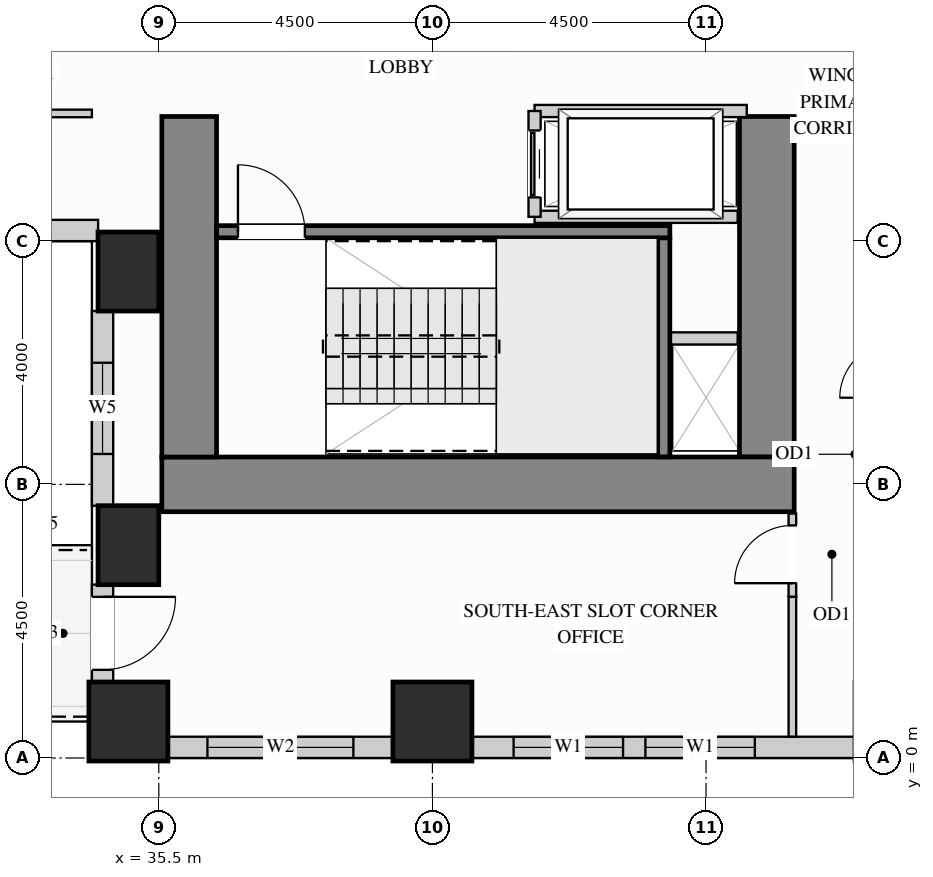
"""IFC4 building model, lengths in metres.
Left out: names, types, materials, properties, quantities, classifications, styles, units other than length and angle.
Written with IfcOpenShell. Run it as: python <this file> out.ifc"""

import sys

from ifc_helpers import new_model, si_unit, direction, frame, frame_2d, origin, origin_2d, place, context, subcontext, project, spatial, rectangle, extrude, source, transform, mapped, element, fill, save


model = new_model("IFC4")
c1 = context("Model", 3, precision=1e-05, world=origin(), true_north=direction((0.0, 1.0)))
c2 = subcontext(c1, "Body", "Model", "MODEL_VIEW")
j1 = project(units=[si_unit("LENGTHUNIT", "METRE"), si_unit("PLANEANGLEUNIT", "RADIAN")], contexts=[c1])
p1 = place(None, origin())
s1 = spatial("IfcSite", under=j1, at=p1, CompositionType="ELEMENT")
p2 = place(p1, origin())
s2 = spatial("IfcBuilding", under=s1, at=p2, CompositionType="ELEMENT")
p3 = place(p2, frame((0.0, 0.0, 47.7)))
s3 = spatial("IfcBuildingStorey", under=s2, at=p3, CompositionType="ELEMENT", Elevation=47.7)
m1 = source(origin(), c2, "Body", "SweptSolid", [
    extrude(rectangle(XDim=1.0, YDim=1.3, at=origin_2d()), origin(), (0.0, 0.0, 1.0), 3.38),
])
for number, where, z_axis, x_axis in (
    (1, (35.0, 3.5, 0.0), (0.0, 0.0, 1.0), (1.0, 0.0, 0.0)),
    (2, (35.0, 8.0, 0.0), (0.0, 0.0, 1.0), (1.0, 0.0, 0.0)),
):
    element("IfcColumn", number, at=place(p3, frame(where, z_axis=z_axis, x_axis=x_axis)), inside=s3, PredefinedType="COLUMN", context=c2, shape_type="MappedRepresentation", body=[
        mapped(m1, transform((0.0, 0.0, 0.0), x_axis=(1.0, 0.0, 0.0), y_axis=(0.0, 1.0, 0.0), z_axis=(0.0, 0.0, 1.0))),
    ])
m2 = source(origin(), c2, "Body", "SweptSolid", [
    extrude(rectangle(XDim=1.3, YDim=1.3, at=origin_2d()), origin(), (0.0, 0.0, 1.0), 3.38),
])
for number, where, z_axis, x_axis in (
    (3, (35.0, 0.6, 0.0), (0.0, 0.0, 1.0), (1.0, 0.0, 0.0)),
    (4, (40.0, 0.6, 0.0), (0.0, 0.0, 1.0), (1.0, 0.0, 0.0)),
):
    element("IfcColumn", number, at=place(p3, frame(where, z_axis=z_axis, x_axis=x_axis)), inside=s3, PredefinedType="COLUMN", context=c2, shape_type="MappedRepresentation", body=[
        mapped(m2, transform((0.0, 0.0, 0.0), x_axis=(1.0, 0.0, 0.0), y_axis=(0.0, 1.0, 0.0), z_axis=(0.0, 0.0, 1.0))),
    ])
m3 = source(origin(), c2, "Body", "SweptSolid", [
    extrude(rectangle(XDim=5.6, YDim=0.9, at=frame_2d((2.8, 0.0))), origin(), (0.0, 0.0, 1.0), 3.38),
])
p4 = place(p3, frame((45.5, 4.95, 0.0), z_axis=(0.0, 0.0, 1.0), x_axis=(0.0, 1.0, 0.0)))
e5 = element("IfcWall", 5, at=p4, inside=s3, PredefinedType="SHEAR", context=c2, shape_type="MappedRepresentation", body=[
    mapped(m3, transform((0.0, 0.0, 0.0), x_axis=(1.0, 0.0, 0.0), y_axis=(0.0, 1.0, 0.0), z_axis=(0.0, 0.0, 1.0))),
])
m4 = source(origin(), c2, "Body", "SweptSolid", [
    extrude(rectangle(XDim=10.4, YDim=0.9, at=frame_2d((5.2, 0.0))), origin(), (0.0, 0.0, 1.0), 3.38),
])
p5 = place(p3, frame((35.55, 4.5, 0.0), z_axis=(0.0, 0.0, 1.0), x_axis=(1.0, 0.0, 0.0)))
e6 = element("IfcWall", 6, at=p5, inside=s3, PredefinedType="SHEAR", context=c2, shape_type="MappedRepresentation", body=[
    mapped(m4, transform((0.0, 0.0, 0.0), x_axis=(1.0, 0.0, 0.0), y_axis=(0.0, 1.0, 0.0), z_axis=(0.0, 0.0, 1.0))),
])
p6 = place(p3, frame((36.0, 4.95, 0.0), z_axis=(0.0, 0.0, 1.0), x_axis=(0.0, 1.0, 0.0)))
e7 = element("IfcWall", 7, at=p6, inside=s3, PredefinedType="SHEAR", context=c2, shape_type="MappedRepresentation", body=[
    mapped(m3, transform((0.0, 0.0, 0.0), x_axis=(1.0, 0.0, 0.0), y_axis=(0.0, 1.0, 0.0), z_axis=(0.0, 0.0, 1.0))),
])
p7 = place(p3, frame((30.998, 8.675, 0.0), z_axis=(0.0, 0.0, 1.0), x_axis=(1.0, 0.0, 0.0)))
e8 = element("IfcWall", 8, at=p7, inside=s3, PredefinedType="SOLIDWALL", context=c2, shape_type="SweptSolid", body=[
    extrude(rectangle(XDim=3.504, YDim=0.35, at=frame_2d((1.752, 0.0))), origin(), (0.0, 0.0, 1.0), 3.365),
])
p8 = place(p7, frame((1.002, 0.0, 0.78)))
e9 = element("IfcOpeningElement", 9, at=p8, cuts=e8, PredefinedType="OPENING", context=c2, shape_type="SweptSolid", body=[
    extrude(rectangle(XDim=1.5, YDim=2.0, at=frame_2d((0.75, 1.0))), frame((0.0, 0.185, 0.0), z_axis=(0.0, -1.0, 0.0), x_axis=(1.0, 0.0, 0.0)), (0.0, 0.0, 1.0), 0.37),
])
p9 = place(p3, frame((34.575, 7.352, 0.0), z_axis=(0.0, 0.0, 1.0), x_axis=(0.0, -1.0, 0.0)))
e10 = element("IfcWall", 10, at=p9, inside=s3, PredefinedType="SOLIDWALL", context=c2, shape_type="SweptSolid", body=[
    extrude(rectangle(XDim=3.204, YDim=0.35, at=frame_2d((1.602, 0.0))), origin(), (0.0, 0.0, 1.0), 2.51),
])
p10 = place(p9, frame((0.852, 0.0, 0.78)))
e11 = element("IfcOpeningElement", 11, at=p10, cuts=e10, PredefinedType="OPENING", context=c2, shape_type="SweptSolid", body=[
    extrude(rectangle(XDim=1.5, YDim=1.55, at=frame_2d((0.75, 0.775))), frame((0.0, 0.185, 0.0), z_axis=(0.0, -1.0, 0.0), x_axis=(1.0, 0.0, 0.0)), (0.0, 0.0, 1.0), 0.37),
])
p11 = place(p3, frame((34.575, 2.852, 0.0), z_axis=(0.0, 0.0, 1.0), x_axis=(0.0, -1.0, 0.0)))
e12 = element("IfcWall", 12, at=p11, inside=s3, PredefinedType="SOLIDWALL", context=c2, shape_type="SweptSolid", body=[
    extrude(rectangle(XDim=1.604, YDim=0.35, at=frame_2d((0.802, 0.0))), origin(), (0.0, 0.0, 1.0), 2.51),
])
p12 = place(p11, frame((0.202, 0.0, 0.0)))
e13 = element("IfcOpeningElement", 13, at=p12, cuts=e12, PredefinedType="OPENING", context=c2, shape_type="SweptSolid", body=[
    extrude(rectangle(XDim=1.2, YDim=2.15, at=frame_2d((0.6, 1.075))), frame((0.0, 0.185, 0.0), z_axis=(0.0, -1.0, 0.0), x_axis=(1.0, 0.0, 0.0)), (0.0, 0.0, 1.0), 0.37),
])
p13 = place(p3, frame((35.648, 0.175, 0.0), z_axis=(0.0, 0.0, 1.0), x_axis=(1.0, 0.0, 0.0)))
e14 = element("IfcWall", 14, at=p13, inside=s3, PredefinedType="SOLIDWALL", context=c2, shape_type="SweptSolid", body=[
    extrude(rectangle(XDim=3.704, YDim=0.35, at=frame_2d((1.852, 0.0))), origin(), (0.0, 0.0, 1.0), 2.51),
])
p14 = place(p13, frame((0.652, 0.0, 0.78)))
e15 = element("IfcOpeningElement", 15, at=p14, cuts=e14, PredefinedType="OPENING", context=c2, shape_type="SweptSolid", body=[
    extrude(rectangle(XDim=2.4, YDim=1.55, at=frame_2d((1.2, 0.775))), frame((0.0, 0.185, 0.0), z_axis=(0.0, -1.0, 0.0), x_axis=(1.0, 0.0, 0.0)), (0.0, 0.0, 1.0), 0.37),
])
p15 = place(p3, frame((40.648, 0.175, 0.0), z_axis=(0.0, 0.0, 1.0), x_axis=(1.0, 0.0, 0.0)))
e16 = element("IfcWall", 16, at=p15, inside=s3, PredefinedType="SOLIDWALL", context=c2, shape_type="SweptSolid", body=[
    extrude(rectangle(XDim=6.304, YDim=0.35, at=frame_2d((3.152, 0.0))), origin(), (0.0, 0.0, 1.0), 2.51),
])
p16 = place(p15, frame((0.687, 0.0, 0.78)))
e17 = element("IfcOpeningElement", 17, at=p16, cuts=e16, PredefinedType="OPENING", context=c2, shape_type="SweptSolid", body=[
    extrude(rectangle(XDim=1.8, YDim=1.55, at=frame_2d((0.9, 0.775))), frame((0.0, 0.185, 0.0), z_axis=(0.0, -1.0, 0.0), x_axis=(1.0, 0.0, 0.0)), (0.0, 0.0, 1.0), 0.37),
])
p17 = place(p15, frame((2.855, 0.0, 0.78)))
e18 = element("IfcOpeningElement", 18, at=p17, cuts=e16, PredefinedType="OPENING", context=c2, shape_type="SweptSolid", body=[
    extrude(rectangle(XDim=1.8, YDim=1.55, at=frame_2d((0.9, 0.775))), frame((0.0, 0.185, 0.0), z_axis=(0.0, -1.0, 0.0), x_axis=(1.0, 0.0, 0.0)), (0.0, 0.0, 1.0), 0.37),
])
p18 = place(p3, frame((45.92, 2.65, 0.0), z_axis=(0.0, 0.0, 1.0), x_axis=(0.0, 1.0, 0.0)))
e19 = element("IfcWall", 19, at=p18, inside=s3, PredefinedType="PARTITIONING", context=c2, shape_type="SweptSolid", body=[
    extrude(rectangle(XDim=1.37, YDim=0.125, at=frame_2d((0.685, 0.0))), origin(), (0.0, 0.0, 1.0), 3.365),
])
p19 = place(p18, frame((0.225, 0.0, 0.0)))
e20 = element("IfcOpeningElement", 20, at=p19, cuts=e19, PredefinedType="OPENING", context=c2, shape_type="SweptSolid", body=[
    extrude(rectangle(XDim=0.95, YDim=2.15, at=frame_2d((0.475, 1.075))), frame((0.0, 0.073, 0.0), z_axis=(0.0, -1.0, 0.0), x_axis=(1.0, 0.0, 0.0)), (0.0, 0.0, 1.0), 0.145),
])
m5 = source(origin(), c2, "Body", "SweptSolid", [
    extrude(rectangle(XDim=2.298, YDim=0.125, at=frame_2d((1.149, 0.0))), origin(), (0.0, 0.0, 1.0), 3.365),
])
p20 = place(p3, frame((45.92, 0.352, 0.0), z_axis=(0.0, 0.0, 1.0), x_axis=(0.0, 1.0, 0.0)))
e21 = element("IfcWall", 21, at=p20, inside=s3, PredefinedType="PARTITIONING", context=c2, shape_type="MappedRepresentation", body=[
    mapped(m5, transform((0.0, 0.0, 0.0), x_axis=(1.0, 0.0, 0.0), y_axis=(0.0, 1.0, 0.0), z_axis=(0.0, 0.0, 1.0))),
])
p21 = place(p3, frame((26.95, 10.6, 0.0), z_axis=(0.0, 0.0, 1.0), x_axis=(1.0, 0.0, 0.0)))
e22 = element("IfcWall", 22, at=p21, inside=s3, PredefinedType="PARTITIONING", context=c2, shape_type="SweptSolid", body=[
    extrude(rectangle(XDim=7.45, YDim=0.125, at=frame_2d((3.725, 0.0))), origin(), (0.0, 0.0, 1.0), 3.365),
])
p22 = place(p21, frame((4.683, 0.0, 0.0)))
e23 = element("IfcOpeningElement", 23, at=p22, cuts=e22, PredefinedType="OPENING", context=c2, shape_type="SweptSolid", body=[
    extrude(rectangle(XDim=0.95, YDim=2.15, at=frame_2d((0.475, 1.075))), frame((0.0, 0.073, 0.0), z_axis=(0.0, -1.0, 0.0), x_axis=(1.0, 0.0, 0.0)), (0.0, 0.0, 1.0), 0.145),
])
m6 = source(origin(), c2, "Body", "SweptSolid", [
    extrude(rectangle(XDim=1.17, YDim=0.2, at=frame_2d((0.585, 0.0))), origin(), (0.0, 0.0, 1.0), 3.365),
])
p23 = place(p3, frame((43.85, 6.9, 0.0), z_axis=(0.0, 0.0, 1.0), x_axis=(1.0, 0.0, 0.0)))
e24 = element("IfcWall", 24, at=p23, inside=s3, PredefinedType="PARTITIONING", context=c2, shape_type="MappedRepresentation", body=[
    mapped(m6, transform((0.0, 0.0, 0.0), x_axis=(1.0, 0.0, 0.0), y_axis=(0.0, 1.0, 0.0), z_axis=(0.0, 0.0, 1.0))),
])
m7 = source(origin(), c2, "Body", "SweptSolid", [
    extrude(rectangle(XDim=3.49, YDim=0.2, at=frame_2d((1.745, 0.0))), origin(), (0.0, 0.0, 1.0), 3.365),
])
p24 = place(p3, frame((41.68, 10.64, 0.0), z_axis=(0.0, 0.0, 1.0), x_axis=(1.0, 0.0, 0.0)))
e25 = element("IfcWall", 25, at=p24, inside=s3, PredefinedType="PARTITIONING", context=c2, shape_type="MappedRepresentation", body=[
    mapped(m7, transform((0.0, 0.0, 0.0), x_axis=(1.0, 0.0, 0.0), y_axis=(0.0, 1.0, 0.0), z_axis=(0.0, 0.0, 1.0))),
])
m8 = source(origin(), c2, "Body", "SweptSolid", [
    extrude(rectangle(XDim=3.34, YDim=0.2, at=frame_2d((1.67, 0.0))), origin(), (0.0, 0.0, 1.0), 3.365),
])
p25 = place(p3, frame((41.68, 8.9, 0.0), z_axis=(0.0, 0.0, 1.0), x_axis=(1.0, 0.0, 0.0)))
e26 = element("IfcWall", 26, at=p25, inside=s3, PredefinedType="PARTITIONING", context=c2, shape_type="MappedRepresentation", body=[
    mapped(m8, transform((0.0, 0.0, 0.0), x_axis=(1.0, 0.0, 0.0), y_axis=(0.0, 1.0, 0.0), z_axis=(0.0, 0.0, 1.0))),
])
p26 = place(p3, frame((41.68, 8.9, 0.0), z_axis=(0.0, 0.0, 1.0), x_axis=(0.0, 1.0, 0.0)))
e27 = element("IfcWall", 27, at=p26, inside=s3, PredefinedType="PARTITIONING", context=c2, shape_type="SweptSolid", body=[
    extrude(rectangle(XDim=1.74, YDim=0.2, at=frame_2d((0.87, 0.0))), origin(), (0.0, 0.0, 1.0), 3.365),
])
p27 = place(p26, frame((0.32, 0.0, 0.0)))
e28 = element("IfcOpeningElement", 28, at=p27, cuts=e27, PredefinedType="OPENING", context=c2, shape_type="SweptSolid", body=[
    extrude(rectangle(XDim=1.1, YDim=2.2, at=frame_2d((0.55, 1.1))), frame((0.0, 0.11, 0.0), z_axis=(0.0, -1.0, 0.0), x_axis=(1.0, 0.0, 0.0)), (0.0, 0.0, 1.0), 0.22),
])
m9 = source(origin(), c2, "Body", "SweptSolid", [
    extrude(rectangle(XDim=3.603, YDim=0.2, at=frame_2d((1.802, 0.0))), origin(), (0.0, 0.0, 1.0), 3.38),
])
p28 = place(p3, frame((43.805, 4.952, 0.0), z_axis=(0.0, 0.0, 1.0), x_axis=(0.0, 1.0, 0.0)))
e29 = element("IfcWall", 29, at=p28, inside=s3, PredefinedType="SHEAR", context=c2, shape_type="MappedRepresentation", body=[
    mapped(m9, transform((0.0, 0.0, 0.0), x_axis=(1.0, 0.0, 0.0), y_axis=(0.0, 1.0, 0.0), z_axis=(0.0, 0.0, 1.0))),
])
p29 = place(p3, frame((36.452, 8.655, 0.0), z_axis=(0.0, 0.0, 1.0), x_axis=(1.0, 0.0, 0.0)))
e30 = element("IfcWall", 30, at=p29, inside=s3, PredefinedType="SHEAR", context=c2, shape_type="SweptSolid", body=[
    extrude(rectangle(XDim=7.453, YDim=0.2, at=frame_2d((3.727, 0.0))), origin(), (0.0, 0.0, 1.0), 3.38),
])
p30 = place(p29, frame((0.35, 0.0, 0.0)))
e31 = element("IfcOpeningElement", 31, at=p30, cuts=e30, PredefinedType="OPENING", context=c2, shape_type="SweptSolid", body=[
    extrude(rectangle(XDim=1.1, YDim=2.15, at=frame_2d((0.55, 1.075))), frame((0.0, 0.11, 0.0), z_axis=(0.0, -1.0, 0.0), x_axis=(1.0, 0.0, 0.0)), (0.0, 0.0, 1.0), 0.22),
])
m10 = source(origin(), c2, "Body", "SweptSolid", [
    extrude(rectangle(XDim=1.2, YDim=2.15, at=frame_2d((0.6, 1.075))), frame((0.0, 0.025, 0.0), z_axis=(0.0, -1.0, 0.0), x_axis=(1.0, 0.0, 0.0)), (0.0, 0.0, 1.0), 0.05),
])
p31 = place(p12, frame((1.2, 0.0, 0.0), z_axis=(0.0, 0.0, 1.0), x_axis=(-1.0, 0.0, 0.0)))
e32 = element("IfcDoor", 32, at=p31, inside=s3, OperationType="SINGLE_SWING_LEFT", PredefinedType="DOOR", context=c2, shape_type="MappedRepresentation", body=[
    mapped(m10, transform((0.0, 0.0, 0.0), x_axis=(1.0, 0.0, 0.0), y_axis=(0.0, 1.0, 0.0), z_axis=(0.0, 0.0, 1.0))),
])
fill(e13, e32)
m11 = source(origin(), c2, "Body", "SweptSolid", [
    extrude(rectangle(XDim=1.1, YDim=2.2, at=frame_2d((0.55, 1.1))), frame((0.0, 0.025, 0.0), z_axis=(0.0, -1.0, 0.0), x_axis=(1.0, 0.0, 0.0)), (0.0, 0.0, 1.0), 0.05),
])
p32 = place(p27, origin())
e33 = element("IfcDoor", 33, at=p32, inside=s3, OperationType="SLIDING_TO_LEFT", PredefinedType="DOOR", context=c2, shape_type="MappedRepresentation", body=[
    mapped(m11, transform((0.0, 0.0, 0.0), x_axis=(1.0, 0.0, 0.0), y_axis=(0.0, 1.0, 0.0), z_axis=(0.0, 0.0, 1.0))),
])
fill(e28, e33)
m12 = source(origin(), c2, "Body", "SweptSolid", [
    extrude(rectangle(XDim=0.95, YDim=2.15, at=frame_2d((0.475, 1.075))), frame((0.0, 0.025, 0.0), z_axis=(0.0, -1.0, 0.0), x_axis=(1.0, 0.0, 0.0)), (0.0, 0.0, 1.0), 0.05),
])
p33 = place(p19, origin())
e34 = element("IfcDoor", 34, at=p33, inside=s3, OperationType="SINGLE_SWING_LEFT", PredefinedType="DOOR", context=c2, shape_type="MappedRepresentation", body=[
    mapped(m12, transform((0.0, 0.0, 0.0), x_axis=(1.0, 0.0, 0.0), y_axis=(0.0, 1.0, 0.0), z_axis=(0.0, 0.0, 1.0))),
])
fill(e20, e34)
m13 = source(origin(), c2, "Body", "SweptSolid", [
    extrude(rectangle(XDim=1.1, YDim=2.15, at=frame_2d((0.55, 1.075))), frame((0.0, 0.025, 0.0), z_axis=(0.0, -1.0, 0.0), x_axis=(1.0, 0.0, 0.0)), (0.0, 0.0, 1.0), 0.05),
])
p34 = place(p30, origin())
e35 = element("IfcDoor", 35, at=p34, inside=s3, OperationType="SINGLE_SWING_LEFT", PredefinedType="DOOR", context=c2, shape_type="MappedRepresentation", body=[
    mapped(m13, transform((0.0, 0.0, 0.0), x_axis=(1.0, 0.0, 0.0), y_axis=(0.0, 1.0, 0.0), z_axis=(0.0, 0.0, 1.0))),
])
fill(e31, e35)
m14 = source(origin(), c2, "Body", "SweptSolid", [
    extrude(rectangle(XDim=1.8, YDim=1.55, at=frame_2d((0.9, 0.775))), frame((0.0, 0.03, 0.0), z_axis=(0.0, -1.0, 0.0), x_axis=(1.0, 0.0, 0.0)), (0.0, 0.0, 1.0), 0.06),
])
p35 = place(p16, origin())
e36 = element("IfcWindow", 36, at=p35, inside=s3, PartitioningType="SINGLE_PANEL", PredefinedType="WINDOW", context=c2, shape_type="MappedRepresentation", body=[
    mapped(m14, transform((0.0, 0.0, 0.0), x_axis=(1.0, 0.0, 0.0), y_axis=(0.0, 1.0, 0.0), z_axis=(0.0, 0.0, 1.0))),
])
fill(e17, e36)
p36 = place(p17, origin())
e37 = element("IfcWindow", 37, at=p36, inside=s3, PartitioningType="SINGLE_PANEL", PredefinedType="WINDOW", context=c2, shape_type="MappedRepresentation", body=[
    mapped(m14, transform((0.0, 0.0, 0.0), x_axis=(1.0, 0.0, 0.0), y_axis=(0.0, 1.0, 0.0), z_axis=(0.0, 0.0, 1.0))),
])
fill(e18, e37)
m15 = source(origin(), c2, "Body", "SweptSolid", [
    extrude(rectangle(XDim=2.4, YDim=1.55, at=frame_2d((1.2, 0.775))), frame((0.0, 0.03, 0.0), z_axis=(0.0, -1.0, 0.0), x_axis=(1.0, 0.0, 0.0)), (0.0, 0.0, 1.0), 0.06),
])
p37 = place(p14, origin())
e38 = element("IfcWindow", 38, at=p37, inside=s3, PartitioningType="SINGLE_PANEL", PredefinedType="WINDOW", context=c2, shape_type="MappedRepresentation", body=[
    mapped(m15, transform((0.0, 0.0, 0.0), x_axis=(1.0, 0.0, 0.0), y_axis=(0.0, 1.0, 0.0), z_axis=(0.0, 0.0, 1.0))),
])
fill(e15, e38)
m16 = source(origin(), c2, "Body", "SweptSolid", [
    extrude(rectangle(XDim=1.5, YDim=1.55, at=frame_2d((0.75, 0.775))), frame((0.0, 0.03, 0.0), z_axis=(0.0, -1.0, 0.0), x_axis=(1.0, 0.0, 0.0)), (0.0, 0.0, 1.0), 0.06),
])
p38 = place(p10, origin())
e39 = element("IfcWindow", 39, at=p38, inside=s3, PartitioningType="SINGLE_PANEL", PredefinedType="WINDOW", context=c2, shape_type="MappedRepresentation", body=[
    mapped(m16, transform((0.0, 0.0, 0.0), x_axis=(1.0, 0.0, 0.0), y_axis=(0.0, 1.0, 0.0), z_axis=(0.0, 0.0, 1.0))),
])
fill(e11, e39)
save(model, sys.argv[1])
